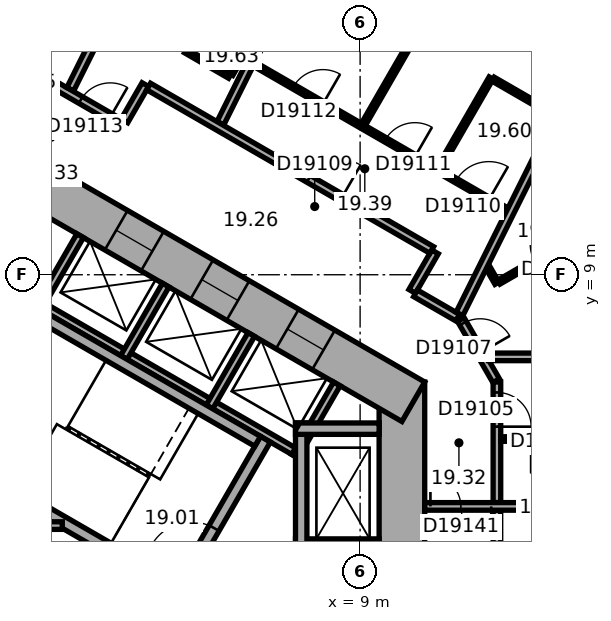
"""IFC4 building model, lengths in metres.
Left out: names, types, materials, properties, quantities, classifications, styles, units other than length and angle.
Written with IfcOpenShell. Run it as: python <this file> out.ifc"""

import sys

from ifc_helpers import new_model, si_unit, direction, frame, frame_2d, origin, place, context, subcontext, project, spatial, rectangle, extrude, element, fill, save


model = new_model("IFC4")
c1 = context("Model", 3, precision=1e-05, world=origin(), true_north=direction((0.0, 1.0)))
c2 = subcontext(c1, "Body", "Model", "MODEL_VIEW")
j1 = project(units=[si_unit("LENGTHUNIT", "METRE"), si_unit("PLANEANGLEUNIT", "RADIAN")], contexts=[c1])
p1 = place(None, origin())
s1 = spatial("IfcSite", under=j1, at=p1, CompositionType="ELEMENT")
p2 = place(p1, origin())
s2 = spatial("IfcBuilding", under=s1, at=p2, CompositionType="ELEMENT")
p3 = place(p2, frame((0.0, 0.0, 86.9)))
s3 = spatial("IfcBuildingStorey", under=s2, at=p3, CompositionType="ELEMENT", Elevation=86.9)
p4 = place(p3, frame((10.1, -6.177, 0.0), z_axis=(0.0, 0.0, 1.0), x_axis=(0.0, 1.0, 0.0)))
e1 = element("IfcWall", 1, at=p4, inside=s3, PredefinedType="SHEAR", context=c2, shape_type="SweptSolid", body=[
    extrude(rectangle(XDim=12.355, YDim=1.2, at=frame_2d((6.177, 0.0))), origin(), (0.0, 0.0, 1.0), 3.3),
])
p5 = place(p4, frame((6.378, 0.0, 0.0)))
e2 = element("IfcOpeningElement", 2, at=p5, cuts=e1, PredefinedType="OPENING", context=c2, shape_type="SweptSolid", body=[
    extrude(rectangle(XDim=1.5, YDim=2.1, at=frame_2d((0.75, 1.05))), frame((0.0, 0.61, 0.0), z_axis=(0.0, -1.0, 0.0), x_axis=(1.0, 0.0, 0.0)), (0.0, 0.0, 1.0), 1.22),
])
p6 = place(p4, frame((1.828, 0.0, 0.0)))
e3 = element("IfcOpeningElement", 3, at=p6, cuts=e1, PredefinedType="OPENING", context=c2, shape_type="SweptSolid", body=[
    extrude(rectangle(XDim=1.1, YDim=2.1, at=frame_2d((0.55, 1.05))), frame((0.0, 0.61, 0.0), z_axis=(0.0, -1.0, 0.0), x_axis=(1.0, 0.0, 0.0)), (0.0, 0.0, 1.0), 1.22),
])
p7 = place(p4, frame((4.427, 0.0, 0.0)))
e4 = element("IfcOpeningElement", 4, at=p7, cuts=e1, PredefinedType="OPENING", context=c2, shape_type="SweptSolid", body=[
    extrude(rectangle(XDim=1.1, YDim=2.1, at=frame_2d((0.55, 1.05))), frame((0.0, 0.61, 0.0), z_axis=(0.0, -1.0, 0.0), x_axis=(1.0, 0.0, 0.0)), (0.0, 0.0, 1.0), 1.22),
])
p8 = place(p3, frame((10.4, 5.658, 0.0), z_axis=(0.0, 0.0, 1.0), x_axis=(-0.866021384402, 0.500006961711, 0.0)))
e5 = element("IfcWall", 5, at=p8, inside=s3, PredefinedType="SHEAR", context=c2, shape_type="SweptSolid", body=[
    extrude(rectangle(XDim=12.355, YDim=1.2, at=frame_2d((6.178, 0.0))), origin(), (0.0, 0.0, 1.0), 3.3),
])
p9 = place(p8, frame((2.728, 0.0, 0.0)))
e6 = element("IfcOpeningElement", 6, at=p9, cuts=e5, PredefinedType="OPENING", context=c2, shape_type="SweptSolid", body=[
    extrude(rectangle(XDim=1.1, YDim=2.1, at=frame_2d((0.55, 1.05))), frame((0.0, 0.61, 0.0), z_axis=(0.0, -1.0, 0.0), x_axis=(1.0, 0.0, 0.0)), (0.0, 0.0, 1.0), 1.22),
])
p10 = place(p8, frame((5.328, 0.0, 0.0)))
e7 = element("IfcOpeningElement", 7, at=p10, cuts=e5, PredefinedType="OPENING", context=c2, shape_type="SweptSolid", body=[
    extrude(rectangle(XDim=1.1, YDim=2.1, at=frame_2d((0.55, 1.05))), frame((0.0, 0.61, 0.0), z_axis=(0.0, -1.0, 0.0), x_axis=(1.0, 0.0, 0.0)), (0.0, 0.0, 1.0), 1.22),
])
p11 = place(p8, frame((7.928, 0.0, 0.0)))
e8 = element("IfcOpeningElement", 8, at=p11, cuts=e5, PredefinedType="OPENING", context=c2, shape_type="SweptSolid", body=[
    extrude(rectangle(XDim=1.1, YDim=2.1, at=frame_2d((0.55, 1.05))), frame((0.0, 0.61, 0.0), z_axis=(0.0, -1.0, 0.0), x_axis=(1.0, 0.0, 0.0)), (0.0, 0.0, 1.0), 1.22),
])
p12 = place(p3, frame((7.424, 4.259, 0.0), z_axis=(0.0, 0.0, 1.0), x_axis=(-0.866026010844, 0.49999894854, 0.0)))
e9 = element("IfcWall", 9, at=p12, inside=s3, PredefinedType="PARTITIONING", context=c2, shape_type="SweptSolid", body=[
    extrude(rectangle(XDim=8.0, YDim=0.2, at=frame_2d((4.0, 0.0))), origin(), (0.0, 0.0, 1.0), 3.05),
])
for number, where, z_axis, x_axis in (
    (10, (7.287, 4.222, 0.0), (0.0, 0.0, 1.0), (0.5, 0.866, 0.0)),
    (11, (5.036, 5.522, 0.0), (0.0, 0.0, 1.0), (0.5, 0.866, 0.0)),
    (12, (2.784, 6.822, 0.0), (0.0, 0.0, 1.0), (0.5, 0.866, 0.0)),
    (13, (0.532, 8.122, 0.0), (0.0, 0.0, 1.0), (0.5, 0.866, 0.0)),
):
    element("IfcWall", number, at=place(p3, frame(where, z_axis=z_axis, x_axis=x_axis)), inside=s3, PredefinedType="PARTITIONING", context=c2, shape_type="SweptSolid", body=[
        extrude(rectangle(XDim=2.2, YDim=0.2, at=frame_2d((1.1, 0.0))), origin(), (0.0, 0.0, 1.0), 3.05),
    ])
p13 = place(p3, frame((4.158, 0.602, 0.0), z_axis=(0.0, 0.0, 1.0), x_axis=(0.499977259774, 0.866038532462, 0.0)))
e14 = element("IfcWall", 14, at=p13, inside=s3, PredefinedType="SHEAR", context=c2, shape_type="SweptSolid", body=[
    extrude(rectangle(XDim=4.7, YDim=0.3, at=frame_2d((2.35, 0.0))), origin(), (0.0, 0.0, 1.0), 3.05),
])
p14 = place(p13, frame((0.8, 0.0, 0.0)))
e15 = element("IfcOpeningElement", 15, at=p14, cuts=e14, PredefinedType="OPENING", context=c2, shape_type="SweptSolid", body=[
    extrude(rectangle(XDim=1.2, YDim=2.1, at=frame_2d((0.6, 1.05))), frame((0.0, 0.16, 0.0), z_axis=(0.0, -1.0, 0.0), x_axis=(1.0, 0.0, 0.0)), (0.0, 0.0, 1.0), 0.32),
])
for number, where, z_axis, x_axis in (
    (16, (4.103, 0.807, 0.0), (0.0, 0.0, 1.0), (-0.866, 0.5, 0.0)),
    (17, (6.303, 4.617, 0.0), (0.0, 0.0, 1.0), (-0.866, 0.5, 0.0)),
):
    element("IfcWall", number, at=place(p3, frame(where, z_axis=z_axis, x_axis=x_axis)), inside=s3, PredefinedType="SHEAR", context=c2, shape_type="SweptSolid", body=[
        extrude(rectangle(XDim=7.06, YDim=0.3, at=frame_2d((3.53, 0.0))), origin(), (0.0, 0.0, 1.0), 3.05),
    ])
p15 = place(p3, frame((7.3, 1.9, 0.0), z_axis=(0.0, 0.0, 1.0), x_axis=(1.0, 0.0, 0.0)))
e18 = element("IfcWall", 18, at=p15, inside=s3, PredefinedType="SHEAR", context=c2, shape_type="SweptSolid", body=[
    extrude(rectangle(XDim=2.2, YDim=0.3, at=frame_2d((1.1, 0.0))), origin(), (0.0, 0.0, 1.0), 3.05),
])
p16 = place(p15, frame((0.7, 0.0, 0.0)))
e19 = element("IfcOpeningElement", 19, at=p16, cuts=e18, PredefinedType="OPENING", context=c2, shape_type="SweptSolid", body=[
    extrude(rectangle(XDim=1.1, YDim=2.1, at=frame_2d((0.55, 1.05))), frame((0.0, 0.16, 0.0), z_axis=(0.0, -1.0, 0.0), x_axis=(1.0, 0.0, 0.0)), (0.0, 0.0, 1.0), 0.32),
])
p17 = place(p3, frame((7.45, 1.75, 0.0), z_axis=(0.0, 0.0, 1.0), x_axis=(0.0, 1.0, 0.0)))
e20 = element("IfcWall", 20, at=p17, inside=s3, PredefinedType="SHEAR", context=c2, shape_type="SweptSolid", body=[
    extrude(rectangle(XDim=3.35, YDim=0.3, at=frame_2d((1.675, 0.0))), origin(), (0.0, 0.0, 1.0), 3.05),
])
p18 = place(p3, frame((7.3, 4.95, 0.0), z_axis=(0.0, 0.0, 1.0), x_axis=(1.0, 0.0, 0.0)))
e21 = element("IfcWall", 21, at=p18, inside=s3, PredefinedType="SHEAR", context=c2, shape_type="SweptSolid", body=[
    extrude(rectangle(XDim=2.2, YDim=0.3, at=frame_2d((1.1, 0.0))), origin(), (0.0, 0.0, 1.0), 3.05),
])
p19 = place(p3, frame((-2.72, 2.4, 0.0), z_axis=(0.0, 0.0, 1.0), x_axis=(1.0, 0.0, 0.0)))
e22 = element("IfcWall", 22, at=p19, inside=s3, PredefinedType="PARTITIONING", context=c2, shape_type="SweptSolid", body=[
    extrude(rectangle(XDim=3.883, YDim=0.2, at=frame_2d((1.941, 0.0))), origin(), (0.0, 0.0, 1.0), 3.05),
])
p20 = place(p3, frame((0.95, 14.001, 0.0), z_axis=(0.0, 0.0, 1.0), x_axis=(-1.0, 0.0, 0.0)))
e23 = element("IfcWall", 23, at=p20, inside=s3, PredefinedType="PARTITIONING", context=c2, shape_type="SweptSolid", body=[
    extrude(rectangle(XDim=1.86, YDim=0.2, at=frame_2d((0.93, 0.0))), origin(), (0.0, 0.0, 1.0), 3.05),
])
p21 = place(p20, frame((0.48, 0.0, 0.0)))
e24 = element("IfcOpeningElement", 24, at=p21, cuts=e23, PredefinedType="OPENING", context=c2, shape_type="SweptSolid", body=[
    extrude(rectangle(XDim=0.9, YDim=2.1, at=frame_2d((0.45, 1.05))), frame((0.0, 0.11, 0.0), z_axis=(0.0, -1.0, 0.0), x_axis=(1.0, 0.0, 0.0)), (0.0, 0.0, 1.0), 0.22),
])
p22 = place(p3, frame((2.748, 12.962, 0.0), z_axis=(0.0, 0.0, 1.0), x_axis=(-0.866013897511, 0.50001992892, 0.0)))
e25 = element("IfcWall", 25, at=p22, inside=s3, PredefinedType="PARTITIONING", context=c2, shape_type="SweptSolid", body=[
    extrude(rectangle(XDim=2.037, YDim=0.2, at=frame_2d((1.018, 0.0))), origin(), (0.0, 0.0, 1.0), 3.05),
])
p23 = place(p22, frame((0.372, 0.0, 0.0)))
e26 = element("IfcOpeningElement", 26, at=p23, cuts=e25, PredefinedType="OPENING", context=c2, shape_type="SweptSolid", body=[
    extrude(rectangle(XDim=0.9, YDim=2.1, at=frame_2d((0.45, 1.05))), frame((0.0, 0.11, 0.0), z_axis=(0.0, -1.0, 0.0), x_axis=(1.0, 0.0, 0.0)), (0.0, 0.0, 1.0), 0.22),
])
p24 = place(p3, frame((3.349, 14.002, 0.0), z_axis=(0.0, 0.0, 1.0), x_axis=(-0.500074377092, -0.865982457891, 0.0)))
e27 = element("IfcWall", 27, at=p24, inside=s3, PredefinedType="PARTITIONING", context=c2, shape_type="SweptSolid", body=[
    extrude(rectangle(XDim=1.101, YDim=0.2, at=frame_2d((0.55, 0.0))), origin(), (0.0, 0.0, 1.0), 3.05),
])
p25 = place(p3, frame((5.351, 21.859, 0.0), z_axis=(0.0, 0.0, 1.0), x_axis=(-0.446205309328, -0.894930624086, 0.0)))
e28 = element("IfcWall", 28, at=p25, inside=s3, PredefinedType="PARTITIONING", context=c2, shape_type="SweptSolid", body=[
    extrude(rectangle(XDim=8.913, YDim=0.2, at=frame_2d((4.457, 0.0))), origin(), (0.0, 0.0, 1.0), 2.6),
])
p26 = place(p3, frame((5.569, 14.222, 0.0), z_axis=(0.0, 0.0, 1.0), x_axis=(-0.866036909293, 0.499980071345, 0.0)))
e29 = element("IfcWall", 29, at=p26, inside=s3, PredefinedType="PARTITIONING", context=c2, shape_type="SweptSolid", body=[
    extrude(rectangle(XDim=1.34, YDim=0.12, at=frame_2d((0.67, 0.0))), origin(), (0.0, 0.0, 1.0), 3.05),
])
p27 = place(p3, frame((6.839, 16.422, 0.0), z_axis=(0.0, 0.0, 1.0), x_axis=(-0.50000366821, -0.866023285932, 0.0)))
e30 = element("IfcWall", 30, at=p27, inside=s3, PredefinedType="PARTITIONING", context=c2, shape_type="SweptSolid", body=[
    extrude(rectangle(XDim=2.48, YDim=0.12, at=frame_2d((1.24, 0.0))), origin(), (0.0, 0.0, 1.0), 3.05),
])
p28 = place(p3, frame((8.872, 20.104, 0.0), z_axis=(0.0, 0.0, 1.0), x_axis=(-0.446218378653, -0.894924107706, 0.0)))
e31 = element("IfcWall", 31, at=p28, inside=s3, PredefinedType="PARTITIONING", context=c2, shape_type="SweptSolid", body=[
    extrude(rectangle(XDim=7.95, YDim=0.2, at=frame_2d((3.975, 0.0))), origin(), (0.0, 0.0, 1.0), 3.05),
])
p29 = place(p3, frame((10.371, 8.561, 0.0), z_axis=(0.0, 0.0, 1.0), x_axis=(0.499986357472, 0.866033280158, 0.0)))
e32 = element("IfcWall", 32, at=p29, inside=s3, PredefinedType="PARTITIONING", context=c2, shape_type="SweptSolid", body=[
    extrude(rectangle(XDim=1.201, YDim=0.2, at=frame_2d((0.601, 0.0))), origin(), (0.0, 0.0, 1.0), 3.05),
])
p30 = place(p3, frame((10.885, 9.652, 0.0), z_axis=(0.0, 0.0, 1.0), x_axis=(-0.866033868542, 0.499985338323, 0.0)))
e33 = element("IfcWall", 33, at=p30, inside=s3, PredefinedType="PARTITIONING", context=c2, shape_type="SweptSolid", body=[
    extrude(rectangle(XDim=8.602, YDim=0.2, at=frame_2d((4.301, 0.0))), origin(), (0.0, 0.0, 1.0), 3.05),
])
p31 = place(p30, frame((2.739, 0.0, 0.0)))
e34 = element("IfcOpeningElement", 34, at=p31, cuts=e33, PredefinedType="OPENING", context=c2, shape_type="SweptSolid", body=[
    extrude(rectangle(XDim=1.0, YDim=2.1, at=frame_2d((0.5, 1.05))), frame((0.0, 0.11, 0.0), z_axis=(0.0, -1.0, 0.0), x_axis=(1.0, 0.0, 0.0)), (0.0, 0.0, 1.0), 0.22),
])
p32 = place(p3, frame((11.566, 7.871, 0.0), z_axis=(0.0, 0.0, 1.0), x_axis=(-0.866004557827, 0.500036104519, 0.0)))
e35 = element("IfcWall", 35, at=p32, inside=s3, PredefinedType="PARTITIONING", context=c2, shape_type="SweptSolid", body=[
    extrude(rectangle(XDim=1.28, YDim=0.2, at=frame_2d((0.64, 0.0))), origin(), (0.0, 0.0, 1.0), 3.05),
])
p33 = place(p3, frame((12.243, 18.423, 0.0), z_axis=(0.0, 0.0, 1.0), x_axis=(-0.499993523031, -0.866029143232, 0.0)))
e36 = element("IfcWall", 36, at=p33, inside=s3, PredefinedType="PARTITIONING", context=c2, shape_type="SweptSolid", body=[
    extrude(rectangle(XDim=6.315, YDim=0.12, at=frame_2d((3.157, 0.0))), origin(), (0.0, 0.0, 1.0), 2.6),
])
p34 = place(p3, frame((12.448, 14.177, 0.0), z_axis=(0.0, 0.0, 1.0), x_axis=(-0.500048966069, -0.865997131366, 0.0)))
e37 = element("IfcWall", 37, at=p34, inside=s3, PredefinedType="PARTITIONING", context=c2, shape_type="SweptSolid", body=[
    extrude(rectangle(XDim=2.74, YDim=0.12, at=frame_2d((1.37, 0.0))), origin(), (0.0, 0.0, 1.0), 3.05),
])
p35 = place(p3, frame((12.58, 6.212, 0.0), z_axis=(0.0, 0.0, 1.0), x_axis=(-0.500063286585, 0.865988862174, 0.0)))
e38 = element("IfcWall", 38, at=p35, inside=s3, PredefinedType="PARTITIONING", context=c2, shape_type="SweptSolid", body=[
    extrude(rectangle(XDim=1.86, YDim=0.2, at=frame_2d((0.93, 0.0))), origin(), (0.0, 0.0, 1.0), 3.05),
])
p36 = place(p35, frame((0.842, 0.0, 0.0)))
e39 = element("IfcOpeningElement", 39, at=p36, cuts=e38, PredefinedType="OPENING", context=c2, shape_type="SweptSolid", body=[
    extrude(rectangle(XDim=0.9, YDim=2.1, at=frame_2d((0.45, 1.05))), frame((0.0, 0.11, 0.0), z_axis=(0.0, -1.0, 0.0), x_axis=(1.0, 0.0, 0.0)), (0.0, 0.0, 1.0), 0.22),
])
p37 = place(p3, frame((12.6, 0.201, 0.0), z_axis=(0.0, 0.0, 1.0), x_axis=(0.0, 1.0, 0.0)))
e40 = element("IfcWall", 40, at=p37, inside=s3, PredefinedType="PARTITIONING", context=c2, shape_type="SweptSolid", body=[
    extrude(rectangle(XDim=2.604, YDim=0.2, at=frame_2d((1.302, 0.0))), origin(), (0.0, 0.0, 1.0), 3.05),
])
p38 = place(p3, frame((12.6, 3.004, 0.0), z_axis=(0.0, 0.0, 1.0), x_axis=(0.0, 1.0, 0.0)))
e41 = element("IfcWall", 41, at=p38, inside=s3, PredefinedType="PARTITIONING", context=c2, shape_type="SweptSolid", body=[
    extrude(rectangle(XDim=3.173, YDim=0.2, at=frame_2d((1.586, 0.0))), origin(), (0.0, 0.0, 1.0), 3.05),
])
p39 = place(p38, frame((1.998, 0.0, 0.0)))
e42 = element("IfcOpeningElement", 42, at=p39, cuts=e41, PredefinedType="OPENING", context=c2, shape_type="SweptSolid", body=[
    extrude(rectangle(XDim=0.9, YDim=2.1, at=frame_2d((0.45, 1.05))), frame((0.0, 0.11, 0.0), z_axis=(0.0, -1.0, 0.0), x_axis=(1.0, 0.0, 0.0)), (0.0, 0.0, 1.0), 0.22),
])
p40 = place(p3, frame((12.601, 8.776, 0.0), z_axis=(0.0, 0.0, 1.0), x_axis=(-0.500166486798, 0.865929261247, 0.0)))
e43 = element("IfcWall", 43, at=p40, inside=s3, PredefinedType="PARTITIONING", context=c2, shape_type="SweptSolid", body=[
    extrude(rectangle(XDim=0.476, YDim=0.12, at=frame_2d((0.238, 0.0))), origin(), (0.0, 0.0, 1.0), 3.05),
])
p41 = place(p3, frame((12.7, 4.677, 0.0), z_axis=(0.0, 0.0, 1.0), x_axis=(1.0, 0.0, 0.0)))
e44 = element("IfcWall", 44, at=p41, inside=s3, PredefinedType="PARTITIONING", context=c2, shape_type="SweptSolid", body=[
    extrude(rectangle(XDim=2.5, YDim=0.12, at=frame_2d((1.25, 0.0))), origin(), (0.0, 0.0, 1.0), 3.05),
])
p42 = place(p41, frame((0.8, 0.0, 0.0)))
e45 = element("IfcOpeningElement", 45, at=p42, cuts=e44, PredefinedType="OPENING", context=c2, shape_type="SweptSolid", body=[
    extrude(rectangle(XDim=0.9, YDim=2.1, at=frame_2d((0.45, 1.05))), frame((0.0, 0.07, 0.0), z_axis=(0.0, -1.0, 0.0), x_axis=(1.0, 0.0, 0.0)), (0.0, 0.0, 1.0), 0.14),
])
p43 = place(p3, frame((12.866, 10.702, 0.0), z_axis=(0.0, 0.0, 1.0), x_axis=(-0.866023151433, 0.500003901167, 0.0)))
e46 = element("IfcWall", 46, at=p43, inside=s3, PredefinedType="PARTITIONING", context=c2, shape_type="SweptSolid", body=[
    extrude(rectangle(XDim=7.684, YDim=0.12, at=frame_2d((3.842, 0.0))), origin(), (0.0, 0.0, 1.0), 3.05),
])
p44 = place(p43, frame((0.55, 0.0, 0.0)))
e47 = element("IfcOpeningElement", 47, at=p44, cuts=e46, PredefinedType="OPENING", context=c2, shape_type="SweptSolid", body=[
    extrude(rectangle(XDim=1.0, YDim=2.1, at=frame_2d((0.5, 1.05))), frame((0.0, 0.07, 0.0), z_axis=(0.0, -1.0, 0.0), x_axis=(1.0, 0.0, 0.0)), (0.0, 0.0, 1.0), 0.14),
])
p45 = place(p43, frame((2.8, 0.0, 0.0)))
e48 = element("IfcOpeningElement", 48, at=p45, cuts=e46, PredefinedType="OPENING", context=c2, shape_type="SweptSolid", body=[
    extrude(rectangle(XDim=0.9, YDim=2.1, at=frame_2d((0.45, 1.05))), frame((0.0, 0.07, 0.0), z_axis=(0.0, -1.0, 0.0), x_axis=(1.0, 0.0, 0.0)), (0.0, 0.0, 1.0), 0.14),
])
p46 = place(p43, frame((5.592, 0.0, 0.0)))
e49 = element("IfcOpeningElement", 49, at=p46, cuts=e46, PredefinedType="OPENING", context=c2, shape_type="SweptSolid", body=[
    extrude(rectangle(XDim=0.9, YDim=2.1, at=frame_2d((0.45, 1.05))), frame((0.0, 0.07, 0.0), z_axis=(0.0, -1.0, 0.0), x_axis=(1.0, 0.0, 0.0)), (0.0, 0.0, 1.0), 0.14),
])
p47 = place(p3, frame((14.118, 13.212, 0.0), z_axis=(0.0, 0.0, 1.0), x_axis=(-0.866039825209, 0.499975020527, 0.0)))
e50 = element("IfcWall", 50, at=p47, inside=s3, PredefinedType="PARTITIONING", context=c2, shape_type="SweptSolid", body=[
    extrude(rectangle(XDim=1.869, YDim=0.12, at=frame_2d((0.934, 0.0))), origin(), (0.0, 0.0, 1.0), 3.05),
])
p48 = place(p3, frame((14.974, 10.146, 0.0), z_axis=(0.0, 0.0, 1.0), x_axis=(-0.86599746015, -0.500048396672, 0.0)))
e51 = element("IfcWall", 51, at=p48, inside=s3, PredefinedType="PARTITIONING", context=c2, shape_type="SweptSolid", body=[
    extrude(rectangle(XDim=2.68, YDim=0.12, at=frame_2d((1.34, 0.0))), origin(), (0.0, 0.0, 1.0), 3.05),
])
p49 = place(p48, frame((0.69, 0.0, 0.0)))
e52 = element("IfcOpeningElement", 52, at=p49, cuts=e51, PredefinedType="OPENING", context=c2, shape_type="SweptSolid", body=[
    extrude(rectangle(XDim=0.9, YDim=2.1, at=frame_2d((0.45, 1.05))), frame((0.0, 0.07, 0.0), z_axis=(0.0, -1.0, 0.0), x_axis=(1.0, 0.0, 0.0)), (0.0, 0.0, 1.0), 0.14),
])
p50 = place(p3, frame((15.915, 16.592, 0.0), z_axis=(0.0, 0.0, 1.0), x_axis=(-0.446199736347, -0.894933402709, 0.0)))
e53 = element("IfcWall", 53, at=p50, inside=s3, PredefinedType="PARTITIONING", context=c2, shape_type="SweptSolid", body=[
    extrude(rectangle(XDim=9.635, YDim=0.2, at=frame_2d((4.817, 0.0))), origin(), (0.0, 0.0, 1.0), 3.05),
])
p51 = place(p3, frame((21.95, 2.905, 0.0), z_axis=(0.0, 0.0, 1.0), x_axis=(-1.0, 0.0, 0.0)))
e54 = element("IfcWall", 54, at=p51, inside=s3, PredefinedType="PARTITIONING", context=c2, shape_type="SweptSolid", body=[
    extrude(rectangle(XDim=11.25, YDim=0.2, at=frame_2d((5.625, 0.0))), origin(), (0.0, 0.0, 1.0), 3.05),
])
p52 = place(p51, frame((9.5, 0.0, 0.0)))
e55 = element("IfcOpeningElement", 55, at=p52, cuts=e54, PredefinedType="OPENING", context=c2, shape_type="SweptSolid", body=[
    extrude(rectangle(XDim=1.6, YDim=2.1, at=frame_2d((0.8, 1.05))), frame((0.0, 0.11, 0.0), z_axis=(0.0, -1.0, 0.0), x_axis=(1.0, 0.0, 0.0)), (0.0, 0.0, 1.0), 0.22),
])
p53 = place(p3, frame((21.95, 6.839, 0.0), z_axis=(0.0, 0.0, 1.0), x_axis=(-1.0, 0.0, 0.0)))
e56 = element("IfcWall", 56, at=p53, inside=s3, PredefinedType="PARTITIONING", context=c2, shape_type="SweptSolid", body=[
    extrude(rectangle(XDim=9.572, YDim=0.2, at=frame_2d((4.786, 0.0))), origin(), (0.0, 0.0, 1.0), 3.05),
])
p54 = place(p14, origin())
e57 = element("IfcDoor", 57, at=p54, inside=s3, OperationType="SINGLE_SWING_RIGHT", PredefinedType="DOOR", context=c2, shape_type="SweptSolid", body=[
    extrude(rectangle(XDim=1.2, YDim=2.1, at=frame_2d((0.6, 1.05))), frame((0.0, 0.025, 0.0), z_axis=(0.0, -1.0, 0.0), x_axis=(1.0, 0.0, 0.0)), (0.0, 0.0, 1.0), 0.05),
])
fill(e15, e57)
p55 = place(p9, origin())
e58 = element("IfcDoor", 58, at=p55, inside=s3, OperationType="DOUBLE_DOOR_SLIDING", PredefinedType="DOOR", context=c2, shape_type="SweptSolid", body=[
    extrude(rectangle(XDim=1.1, YDim=2.1, at=frame_2d((0.55, 1.05))), frame((0.0, 0.025, 0.0), z_axis=(0.0, -1.0, 0.0), x_axis=(1.0, 0.0, 0.0)), (0.0, 0.0, 1.0), 0.05),
])
fill(e6, e58)
p56 = place(p10, origin())
e59 = element("IfcDoor", 59, at=p56, inside=s3, OperationType="DOUBLE_DOOR_SLIDING", PredefinedType="DOOR", context=c2, shape_type="SweptSolid", body=[
    extrude(rectangle(XDim=1.1, YDim=2.1, at=frame_2d((0.55, 1.05))), frame((0.0, 0.025, 0.0), z_axis=(0.0, -1.0, 0.0), x_axis=(1.0, 0.0, 0.0)), (0.0, 0.0, 1.0), 0.05),
])
fill(e7, e59)
p57 = place(p11, origin())
e60 = element("IfcDoor", 60, at=p57, inside=s3, OperationType="DOUBLE_DOOR_SLIDING", PredefinedType="DOOR", context=c2, shape_type="SweptSolid", body=[
    extrude(rectangle(XDim=1.1, YDim=2.1, at=frame_2d((0.55, 1.05))), frame((0.0, 0.025, 0.0), z_axis=(0.0, -1.0, 0.0), x_axis=(1.0, 0.0, 0.0)), (0.0, 0.0, 1.0), 0.05),
])
fill(e8, e60)
p58 = place(p39, origin())
e61 = element("IfcDoor", 61, at=p58, inside=s3, OperationType="SINGLE_SWING_LEFT", PredefinedType="DOOR", context=c2, shape_type="SweptSolid", body=[
    extrude(rectangle(XDim=0.9, YDim=2.1, at=frame_2d((0.45, 1.05))), frame((0.0, 0.025, 0.0), z_axis=(0.0, -1.0, 0.0), x_axis=(1.0, 0.0, 0.0)), (0.0, 0.0, 1.0), 0.05),
])
fill(e42, e61)
p59 = place(p36, origin())
e62 = element("IfcDoor", 62, at=p59, inside=s3, OperationType="SINGLE_SWING_LEFT", PredefinedType="DOOR", context=c2, shape_type="SweptSolid", body=[
    extrude(rectangle(XDim=0.9, YDim=2.1, at=frame_2d((0.45, 1.05))), frame((0.0, 0.025, 0.0), z_axis=(0.0, -1.0, 0.0), x_axis=(1.0, 0.0, 0.0)), (0.0, 0.0, 1.0), 0.05),
])
fill(e39, e62)
p60 = place(p31, origin())
e63 = element("IfcDoor", 63, at=p60, inside=s3, OperationType="SINGLE_SWING_LEFT", PredefinedType="DOOR", context=c2, shape_type="SweptSolid", body=[
    extrude(rectangle(XDim=1.0, YDim=2.1, at=frame_2d((0.5, 1.05))), frame((0.0, 0.025, 0.0), z_axis=(0.0, -1.0, 0.0), x_axis=(1.0, 0.0, 0.0)), (0.0, 0.0, 1.0), 0.05),
])
fill(e34, e63)
p61 = place(p44, origin())
e64 = element("IfcDoor", 64, at=p61, inside=s3, OperationType="SINGLE_SWING_LEFT", PredefinedType="DOOR", context=c2, shape_type="SweptSolid", body=[
    extrude(rectangle(XDim=1.0, YDim=2.1, at=frame_2d((0.5, 1.05))), frame((0.0, 0.025, 0.0), z_axis=(0.0, -1.0, 0.0), x_axis=(1.0, 0.0, 0.0)), (0.0, 0.0, 1.0), 0.05),
])
fill(e47, e64)
p62 = place(p45, origin())
e65 = element("IfcDoor", 65, at=p62, inside=s3, OperationType="SINGLE_SWING_LEFT", PredefinedType="DOOR", context=c2, shape_type="SweptSolid", body=[
    extrude(rectangle(XDim=0.9, YDim=2.1, at=frame_2d((0.45, 1.05))), frame((0.0, 0.025, 0.0), z_axis=(0.0, -1.0, 0.0), x_axis=(1.0, 0.0, 0.0)), (0.0, 0.0, 1.0), 0.05),
])
fill(e48, e65)
p63 = place(p46, origin())
e66 = element("IfcDoor", 66, at=p63, inside=s3, OperationType="SINGLE_SWING_LEFT", PredefinedType="DOOR", context=c2, shape_type="SweptSolid", body=[
    extrude(rectangle(XDim=0.9, YDim=2.1, at=frame_2d((0.45, 1.05))), frame((0.0, 0.025, 0.0), z_axis=(0.0, -1.0, 0.0), x_axis=(1.0, 0.0, 0.0)), (0.0, 0.0, 1.0), 0.05),
])
fill(e49, e66)
p64 = place(p23, origin())
e67 = element("IfcDoor", 67, at=p64, inside=s3, OperationType="SINGLE_SWING_LEFT", PredefinedType="DOOR", context=c2, shape_type="SweptSolid", body=[
    extrude(rectangle(XDim=0.9, YDim=2.1, at=frame_2d((0.45, 1.05))), frame((0.0, 0.025, 0.0), z_axis=(0.0, -1.0, 0.0), x_axis=(1.0, 0.0, 0.0)), (0.0, 0.0, 1.0), 0.05),
])
fill(e26, e67)
p65 = place(p52, origin())
e68 = element("IfcDoor", 68, at=p65, inside=s3, OperationType="DOUBLE_DOOR_SINGLE_SWING", PredefinedType="DOOR", context=c2, shape_type="SweptSolid", body=[
    extrude(rectangle(XDim=1.6, YDim=2.1, at=frame_2d((0.8, 1.05))), frame((0.0, 0.025, 0.0), z_axis=(0.0, -1.0, 0.0), x_axis=(1.0, 0.0, 0.0)), (0.0, 0.0, 1.0), 0.05),
])
fill(e55, e68)
save(model, sys.argv[1])
